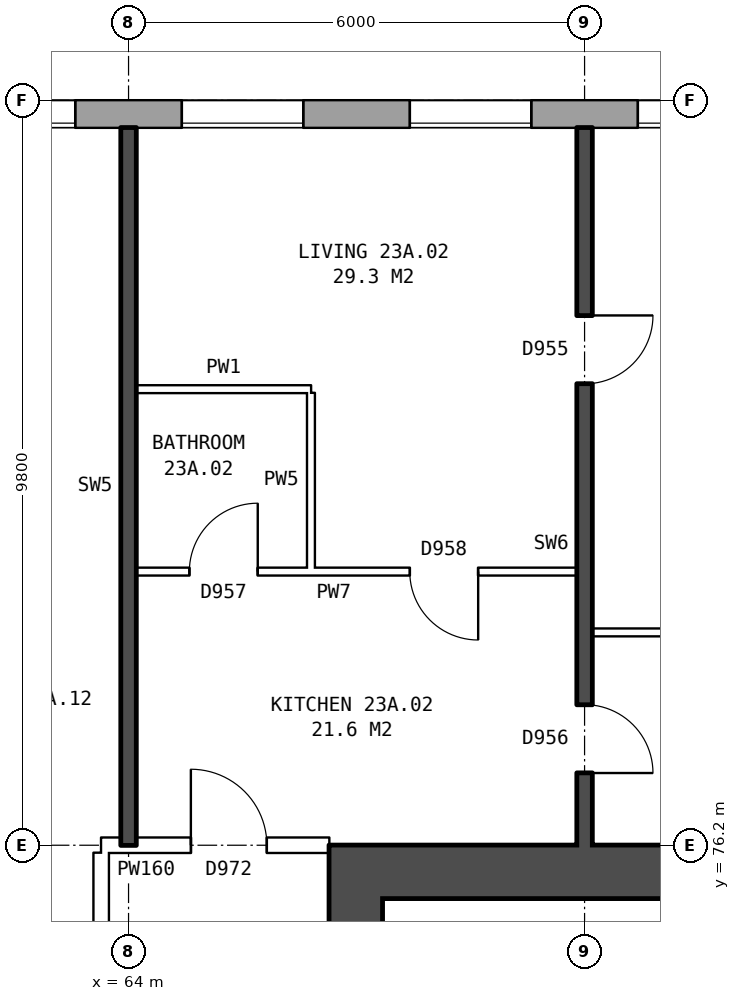
"""IFC4 building model, lengths in metres.
Left out: names, types, materials, properties, quantities, classifications, styles, units other than length and angle.
Written with IfcOpenShell. Run it as: python <this file> out.ifc"""

import sys

from ifc_helpers import new_model, si_unit, direction, frame, frame_2d, origin, place, context, subcontext, project, spatial, rectangle, extrude, element, fill, save


model = new_model("IFC4")
c1 = context("Model", 3, precision=1e-05, world=origin(), true_north=direction((0.0, 1.0)))
c2 = subcontext(c1, "Body", "Model", "MODEL_VIEW")
j1 = project(units=[si_unit("LENGTHUNIT", "METRE"), si_unit("PLANEANGLEUNIT", "RADIAN")], contexts=[c1])
p1 = place(None, origin())
s1 = spatial("IfcSite", under=j1, at=p1, CompositionType="ELEMENT")
p2 = place(p1, origin())
s2 = spatial("IfcBuilding", under=s1, at=p2, CompositionType="ELEMENT")
p3 = place(p2, frame((0.0, 0.0, 84.0)))
s3 = spatial("IfcBuildingStorey", under=s2, at=p3, CompositionType="ELEMENT", Elevation=84.0)
p4 = place(p3, frame((72.925, 85.82, 0.0), z_axis=(0.0, 0.0, 1.0), x_axis=(-1.0, 0.0, 0.0)))
e1 = element("IfcWall", 1, at=p4, inside=s3, PredefinedType="STANDARD", context=c2, shape_type="SweptSolid", body=[
    extrude(rectangle(XDim=46.601, YDim=0.36, at=frame_2d((23.3, 0.0))), origin(), (0.0, 0.0, 1.0), 2.85),
])
p5 = place(p4, frame((0.625, 0.0, 0.8)))
e2 = element("IfcOpeningElement", 2, at=p5, cuts=e1, PredefinedType="OPENING", context=c2, shape_type="SweptSolid", body=[
    extrude(rectangle(XDim=1.6, YDim=1.8, at=frame_2d((0.8, 0.9))), frame((0.0, 0.19, 0.0), z_axis=(0.0, -1.0, 0.0), x_axis=(1.0, 0.0, 0.0)), (0.0, 0.0, 1.0), 0.38),
])
p6 = place(p4, frame((3.625, 0.0, 0.8)))
e3 = element("IfcOpeningElement", 3, at=p6, cuts=e1, PredefinedType="OPENING", context=c2, shape_type="SweptSolid", body=[
    extrude(rectangle(XDim=1.6, YDim=1.8, at=frame_2d((0.8, 0.9))), frame((0.0, 0.19, 0.0), z_axis=(0.0, -1.0, 0.0), x_axis=(1.0, 0.0, 0.0)), (0.0, 0.0, 1.0), 0.38),
])
p7 = place(p4, frame((6.625, 0.0, 0.8)))
e4 = element("IfcOpeningElement", 4, at=p7, cuts=e1, PredefinedType="OPENING", context=c2, shape_type="SweptSolid", body=[
    extrude(rectangle(XDim=1.6, YDim=1.8, at=frame_2d((0.8, 0.9))), frame((0.0, 0.19, 0.0), z_axis=(0.0, -1.0, 0.0), x_axis=(1.0, 0.0, 0.0)), (0.0, 0.0, 1.0), 0.38),
])
p8 = place(p4, frame((9.625, 0.0, 0.8)))
e5 = element("IfcOpeningElement", 5, at=p8, cuts=e1, PredefinedType="OPENING", context=c2, shape_type="SweptSolid", body=[
    extrude(rectangle(XDim=1.6, YDim=1.8, at=frame_2d((0.8, 0.9))), frame((0.0, 0.19, 0.0), z_axis=(0.0, -1.0, 0.0), x_axis=(1.0, 0.0, 0.0)), (0.0, 0.0, 1.0), 0.38),
])
p9 = place(p4, frame((12.625, 0.0, 0.8)))
e6 = element("IfcOpeningElement", 6, at=p9, cuts=e1, PredefinedType="OPENING", context=c2, shape_type="SweptSolid", body=[
    extrude(rectangle(XDim=1.6, YDim=1.8, at=frame_2d((0.8, 0.9))), frame((0.0, 0.19, 0.0), z_axis=(0.0, -1.0, 0.0), x_axis=(1.0, 0.0, 0.0)), (0.0, 0.0, 1.0), 0.38),
])
p10 = place(p4, frame((15.125, 0.0, 0.8)))
e7 = element("IfcOpeningElement", 7, at=p10, cuts=e1, PredefinedType="OPENING", context=c2, shape_type="SweptSolid", body=[
    extrude(rectangle(XDim=1.6, YDim=1.8, at=frame_2d((0.8, 0.9))), frame((0.0, 0.19, 0.0), z_axis=(0.0, -1.0, 0.0), x_axis=(1.0, 0.0, 0.0)), (0.0, 0.0, 1.0), 0.38),
])
p11 = place(p4, frame((18.625, 0.0, 0.35)))
e8 = element("IfcOpeningElement", 8, at=p11, cuts=e1, PredefinedType="OPENING", context=c2, shape_type="SweptSolid", body=[
    extrude(rectangle(XDim=0.8, YDim=0.9, at=frame_2d((0.4, 0.45))), frame((0.0, 0.19, 0.0), z_axis=(0.0, -1.0, 0.0), x_axis=(1.0, 0.0, 0.0)), (0.0, 0.0, 1.0), 0.38),
])
p12 = place(p4, frame((21.625, 0.0, 0.8)))
e9 = element("IfcOpeningElement", 9, at=p12, cuts=e1, PredefinedType="OPENING", context=c2, shape_type="SweptSolid", body=[
    extrude(rectangle(XDim=1.6, YDim=1.8, at=frame_2d((0.8, 0.9))), frame((0.0, 0.19, 0.0), z_axis=(0.0, -1.0, 0.0), x_axis=(1.0, 0.0, 0.0)), (0.0, 0.0, 1.0), 0.38),
])
p13 = place(p4, frame((24.625, 0.0, 0.8)))
e10 = element("IfcOpeningElement", 10, at=p13, cuts=e1, PredefinedType="OPENING", context=c2, shape_type="SweptSolid", body=[
    extrude(rectangle(XDim=1.6, YDim=1.8, at=frame_2d((0.8, 0.9))), frame((0.0, 0.19, 0.0), z_axis=(0.0, -1.0, 0.0), x_axis=(1.0, 0.0, 0.0)), (0.0, 0.0, 1.0), 0.38),
])
p14 = place(p4, frame((29.075, 0.0, 1.4)))
e11 = element("IfcOpeningElement", 11, at=p14, cuts=e1, PredefinedType="OPENING", context=c2, shape_type="SweptSolid", body=[
    extrude(rectangle(XDim=1.2, YDim=1.2, at=frame_2d((0.6, 0.6))), frame((0.0, 0.19, 0.0), z_axis=(0.0, -1.0, 0.0), x_axis=(1.0, 0.0, 0.0)), (0.0, 0.0, 1.0), 0.38),
])
p15 = place(p4, frame((30.625, 0.0, 0.8)))
e12 = element("IfcOpeningElement", 12, at=p15, cuts=e1, PredefinedType="OPENING", context=c2, shape_type="SweptSolid", body=[
    extrude(rectangle(XDim=1.6, YDim=1.8, at=frame_2d((0.8, 0.9))), frame((0.0, 0.19, 0.0), z_axis=(0.0, -1.0, 0.0), x_axis=(1.0, 0.0, 0.0)), (0.0, 0.0, 1.0), 0.38),
])
p16 = place(p4, frame((33.625, 0.0, 0.8)))
e13 = element("IfcOpeningElement", 13, at=p16, cuts=e1, PredefinedType="OPENING", context=c2, shape_type="SweptSolid", body=[
    extrude(rectangle(XDim=1.6, YDim=1.8, at=frame_2d((0.8, 0.9))), frame((0.0, 0.19, 0.0), z_axis=(0.0, -1.0, 0.0), x_axis=(1.0, 0.0, 0.0)), (0.0, 0.0, 1.0), 0.38),
])
p17 = place(p4, frame((36.625, 0.0, 0.8)))
e14 = element("IfcOpeningElement", 14, at=p17, cuts=e1, PredefinedType="OPENING", context=c2, shape_type="SweptSolid", body=[
    extrude(rectangle(XDim=1.6, YDim=1.8, at=frame_2d((0.8, 0.9))), frame((0.0, 0.19, 0.0), z_axis=(0.0, -1.0, 0.0), x_axis=(1.0, 0.0, 0.0)), (0.0, 0.0, 1.0), 0.38),
])
p18 = place(p4, frame((39.625, 0.0, 0.8)))
e15 = element("IfcOpeningElement", 15, at=p18, cuts=e1, PredefinedType="OPENING", context=c2, shape_type="SweptSolid", body=[
    extrude(rectangle(XDim=1.6, YDim=1.8, at=frame_2d((0.8, 0.9))), frame((0.0, 0.19, 0.0), z_axis=(0.0, -1.0, 0.0), x_axis=(1.0, 0.0, 0.0)), (0.0, 0.0, 1.0), 0.38),
])
p19 = place(p4, frame((42.625, 0.0, 0.8)))
e16 = element("IfcOpeningElement", 16, at=p19, cuts=e1, PredefinedType="OPENING", context=c2, shape_type="SweptSolid", body=[
    extrude(rectangle(XDim=1.6, YDim=1.8, at=frame_2d((0.8, 0.9))), frame((0.0, 0.19, 0.0), z_axis=(0.0, -1.0, 0.0), x_axis=(1.0, 0.0, 0.0)), (0.0, 0.0, 1.0), 0.38),
])
p20 = place(p4, frame((17.025, 0.0, 1.5)))
e17 = element("IfcOpeningElement", 17, at=p20, cuts=e1, PredefinedType="OPENING", context=c2, shape_type="SweptSolid", body=[
    extrude(rectangle(XDim=0.6, YDim=0.9, at=frame_2d((0.3, 0.45))), frame((0.0, 0.19, 0.0), z_axis=(0.0, -1.0, 0.0), x_axis=(1.0, 0.0, 0.0)), (0.0, 0.0, 1.0), 0.38),
])
p21 = place(p4, frame((19.725, 0.0, 0.35)))
e18 = element("IfcOpeningElement", 18, at=p21, cuts=e1, PredefinedType="OPENING", context=c2, shape_type="SweptSolid", body=[
    extrude(rectangle(XDim=1.0, YDim=1.8, at=frame_2d((0.5, 0.9))), frame((0.0, 0.19, 0.0), z_axis=(0.0, -1.0, 0.0), x_axis=(1.0, 0.0, 0.0)), (0.0, 0.0, 1.0), 0.38),
])
p22 = place(p3, frame((66.99, 64.5, 0.0), z_axis=(0.0, 0.0, 1.0), x_axis=(0.0, 1.0, 0.0)))
e19 = element("IfcWall", 19, at=p22, inside=s3, PredefinedType="SHEAR", context=c2, shape_type="SweptSolid", body=[
    extrude(rectangle(XDim=11.0, YDim=0.7, at=frame_2d((5.5, 0.0))), origin(), (0.0, 0.0, 1.0), 2.85),
])
p23 = place(p22, frame((0.625, 0.0, 0.0)))
e20 = element("IfcOpeningElement", 20, at=p23, cuts=e19, PredefinedType="OPENING", context=c2, shape_type="SweptSolid", body=[
    extrude(rectangle(XDim=1.1, YDim=2.1, at=frame_2d((0.55, 1.05))), frame((0.0, 0.36, 0.0), z_axis=(0.0, -1.0, 0.0), x_axis=(1.0, 0.0, 0.0)), (0.0, 0.0, 1.0), 0.72),
])
p24 = place(p22, frame((9.2, 0.0, 0.0)))
e21 = element("IfcOpeningElement", 21, at=p24, cuts=e19, PredefinedType="OPENING", context=c2, shape_type="SweptSolid", body=[
    extrude(rectangle(XDim=1.1, YDim=2.1, at=frame_2d((0.55, 1.05))), frame((0.0, 0.36, 0.0), z_axis=(0.0, -1.0, 0.0), x_axis=(1.0, 0.0, 0.0)), (0.0, 0.0, 1.0), 0.72),
])
p25 = place(p3, frame((66.64, 75.85, 0.0), z_axis=(0.0, 0.0, 1.0), x_axis=(1.0, 0.0, 0.0)))
e22 = element("IfcWall", 22, at=p25, inside=s3, PredefinedType="SHEAR", context=c2, shape_type="SweptSolid", body=[
    extrude(rectangle(XDim=9.0, YDim=0.7, at=frame_2d((4.5, 0.0))), origin(), (0.0, 0.0, 1.0), 2.85),
])
p26 = place(p3, frame((63.64, 63.9, 0.0), z_axis=(0.0, 0.0, 1.0), x_axis=(0.0, 1.0, 0.0)))
e23 = element("IfcWall", 23, at=p26, inside=s3, PredefinedType="PARTITIONING", context=c2, shape_type="SweptSolid", body=[
    extrude(rectangle(XDim=12.2, YDim=0.2, at=frame_2d((6.1, 0.0))), origin(), (0.0, 0.0, 1.0), 2.85),
])
p27 = place(p26, frame((5.1, 0.0, 0.0)))
e24 = element("IfcOpeningElement", 24, at=p27, cuts=e23, PredefinedType="OPENING", context=c2, shape_type="SweptSolid", body=[
    extrude(rectangle(XDim=2.0, YDim=2.1, at=frame_2d((1.0, 1.05))), frame((0.0, 0.11, 0.0), z_axis=(0.0, -1.0, 0.0), x_axis=(1.0, 0.0, 0.0)), (0.0, 0.0, 1.0), 0.22),
])
p28 = place(p3, frame((63.64, 76.2, 0.0), z_axis=(0.0, 0.0, 1.0), x_axis=(1.0, 0.0, 0.0)))
e25 = element("IfcWall", 25, at=p28, inside=s3, PredefinedType="PARTITIONING", context=c2, shape_type="SweptSolid", body=[
    extrude(rectangle(XDim=3.0, YDim=0.2, at=frame_2d((1.5, 0.0))), origin(), (0.0, 0.0, 1.0), 2.85),
])
p29 = place(p28, frame((1.18, 0.0, 0.0)))
e26 = element("IfcOpeningElement", 26, at=p29, cuts=e25, PredefinedType="OPENING", context=c2, shape_type="SweptSolid", body=[
    extrude(rectangle(XDim=1.0, YDim=2.1, at=frame_2d((0.5, 1.05))), frame((0.0, 0.11, 0.0), z_axis=(0.0, -1.0, 0.0), x_axis=(1.0, 0.0, 0.0)), (0.0, 0.0, 1.0), 0.22),
])
p30 = place(p3, frame((70.1, 79.0, 0.0), z_axis=(0.0, 0.0, 1.0), x_axis=(1.0, 0.0, 0.0)))
e27 = element("IfcWall", 27, at=p30, inside=s3, PredefinedType="PARTITIONING", context=c2, shape_type="SweptSolid", body=[
    extrude(rectangle(XDim=5.54, YDim=0.1, at=frame_2d((2.77, 0.0))), origin(), (0.0, 0.0, 1.0), 2.85),
])
p31 = place(p3, frame((64.1, 79.8, 0.0), z_axis=(0.0, 0.0, 1.0), x_axis=(1.0, 0.0, 0.0)))
e28 = element("IfcWall", 28, at=p31, inside=s3, PredefinedType="PARTITIONING", context=c2, shape_type="SweptSolid", body=[
    extrude(rectangle(XDim=5.8, YDim=0.1, at=frame_2d((2.9, 0.0))), origin(), (0.0, 0.0, 1.0), 2.85),
])
p32 = place(p31, frame((3.6, 0.0, 0.0)))
e29 = element("IfcOpeningElement", 29, at=p32, cuts=e28, PredefinedType="OPENING", context=c2, shape_type="SweptSolid", body=[
    extrude(rectangle(XDim=0.9, YDim=2.1, at=frame_2d((0.45, 1.05))), frame((0.0, 0.06, 0.0), z_axis=(0.0, -1.0, 0.0), x_axis=(1.0, 0.0, 0.0)), (0.0, 0.0, 1.0), 0.12),
])
p33 = place(p31, frame((0.7, 0.0, 0.0)))
e30 = element("IfcOpeningElement", 30, at=p33, cuts=e28, PredefinedType="OPENING", context=c2, shape_type="SweptSolid", body=[
    extrude(rectangle(XDim=0.9, YDim=2.1, at=frame_2d((0.45, 1.05))), frame((0.0, 0.06, 0.0), z_axis=(0.0, -1.0, 0.0), x_axis=(1.0, 0.0, 0.0)), (0.0, 0.0, 1.0), 0.12),
])
p34 = place(p3, frame((64.1, 82.2, 0.0), z_axis=(0.0, 0.0, 1.0), x_axis=(1.0, 0.0, 0.0)))
e31 = element("IfcWall", 31, at=p34, inside=s3, PredefinedType="PARTITIONING", context=c2, shape_type="SweptSolid", body=[
    extrude(rectangle(XDim=2.3, YDim=0.1, at=frame_2d((1.15, 0.0))), origin(), (0.0, 0.0, 1.0), 2.85),
])
p35 = place(p3, frame((64.0, 76.2, 0.0), z_axis=(0.0, 0.0, 1.0), x_axis=(0.0, 1.0, 0.0)))
e32 = element("IfcWall", 32, at=p35, inside=s3, PredefinedType="SOLIDWALL", context=c2, shape_type="SweptSolid", body=[
    extrude(rectangle(XDim=9.44, YDim=0.2, at=frame_2d((4.72, 0.0))), origin(), (0.0, 0.0, 1.0), 2.85),
])
p36 = place(p3, frame((66.4, 79.85, 0.0), z_axis=(0.0, 0.0, 1.0), x_axis=(0.0, 1.0, 0.0)))
e33 = element("IfcWall", 33, at=p36, inside=s3, PredefinedType="PARTITIONING", context=c2, shape_type="SweptSolid", body=[
    extrude(rectangle(XDim=2.3, YDim=0.1, at=frame_2d((1.15, 0.0))), origin(), (0.0, 0.0, 1.0), 2.85),
])
p37 = place(p3, frame((70.0, 76.2, 0.0), z_axis=(0.0, 0.0, 1.0), x_axis=(0.0, 1.0, 0.0)))
e34 = element("IfcWall", 34, at=p37, inside=s3, PredefinedType="SOLIDWALL", context=c2, shape_type="SweptSolid", body=[
    extrude(rectangle(XDim=9.44, YDim=0.2, at=frame_2d((4.72, 0.0))), origin(), (0.0, 0.0, 1.0), 2.85),
])
p38 = place(p37, frame((6.07, 0.0, 0.0)))
e35 = element("IfcOpeningElement", 35, at=p38, cuts=e34, PredefinedType="OPENING", context=c2, shape_type="SweptSolid", body=[
    extrude(rectangle(XDim=0.9, YDim=2.1, at=frame_2d((0.45, 1.05))), frame((0.0, 0.11, 0.0), z_axis=(0.0, -1.0, 0.0), x_axis=(1.0, 0.0, 0.0)), (0.0, 0.0, 1.0), 0.22),
])
p39 = place(p37, frame((0.95, 0.0, 0.0)))
e36 = element("IfcOpeningElement", 36, at=p39, cuts=e34, PredefinedType="OPENING", context=c2, shape_type="SweptSolid", body=[
    extrude(rectangle(XDim=0.9, YDim=2.1, at=frame_2d((0.45, 1.05))), frame((0.0, 0.11, 0.0), z_axis=(0.0, -1.0, 0.0), x_axis=(1.0, 0.0, 0.0)), (0.0, 0.0, 1.0), 0.22),
])
p40 = place(p5, origin())
e37 = element("IfcWindow", 37, at=p40, inside=s3, PartitioningType="SINGLE_PANEL", PredefinedType="WINDOW", context=c2, shape_type="SweptSolid", body=[
    extrude(rectangle(XDim=1.6, YDim=1.8, at=frame_2d((0.8, 0.9))), frame((0.0, 0.15, 0.0), z_axis=(0.0, -1.0, 0.0), x_axis=(1.0, 0.0, 0.0)), (0.0, 0.0, 1.0), 0.06),
])
fill(e2, e37)
p41 = place(p6, origin())
e38 = element("IfcWindow", 38, at=p41, inside=s3, PartitioningType="SINGLE_PANEL", PredefinedType="WINDOW", context=c2, shape_type="SweptSolid", body=[
    extrude(rectangle(XDim=1.6, YDim=1.8, at=frame_2d((0.8, 0.9))), frame((0.0, 0.15, 0.0), z_axis=(0.0, -1.0, 0.0), x_axis=(1.0, 0.0, 0.0)), (0.0, 0.0, 1.0), 0.06),
])
fill(e3, e38)
p42 = place(p7, origin())
e39 = element("IfcWindow", 39, at=p42, inside=s3, PartitioningType="SINGLE_PANEL", PredefinedType="WINDOW", context=c2, shape_type="SweptSolid", body=[
    extrude(rectangle(XDim=1.6, YDim=1.8, at=frame_2d((0.8, 0.9))), frame((0.0, 0.15, 0.0), z_axis=(0.0, -1.0, 0.0), x_axis=(1.0, 0.0, 0.0)), (0.0, 0.0, 1.0), 0.06),
])
fill(e4, e39)
p43 = place(p8, origin())
e40 = element("IfcWindow", 40, at=p43, inside=s3, PartitioningType="SINGLE_PANEL", PredefinedType="WINDOW", context=c2, shape_type="SweptSolid", body=[
    extrude(rectangle(XDim=1.6, YDim=1.8, at=frame_2d((0.8, 0.9))), frame((0.0, 0.15, 0.0), z_axis=(0.0, -1.0, 0.0), x_axis=(1.0, 0.0, 0.0)), (0.0, 0.0, 1.0), 0.06),
])
fill(e5, e40)
p44 = place(p38, frame((0.9, 0.0, 0.0), z_axis=(0.0, 0.0, 1.0), x_axis=(-1.0, 0.0, 0.0)))
e41 = element("IfcDoor", 41, at=p44, inside=s3, OperationType="SINGLE_SWING_LEFT", PredefinedType="DOOR", context=c2, shape_type="SweptSolid", body=[
    extrude(rectangle(XDim=0.9, YDim=2.1, at=frame_2d((0.45, 1.05))), frame((0.0, 0.025, 0.0), z_axis=(0.0, -1.0, 0.0), x_axis=(1.0, 0.0, 0.0)), (0.0, 0.0, 1.0), 0.05),
])
fill(e35, e41)
p45 = place(p39, frame((0.9, 0.0, 0.0), z_axis=(0.0, 0.0, 1.0), x_axis=(-1.0, 0.0, 0.0)))
e42 = element("IfcDoor", 42, at=p45, inside=s3, OperationType="SINGLE_SWING_RIGHT", PredefinedType="DOOR", context=c2, shape_type="SweptSolid", body=[
    extrude(rectangle(XDim=0.9, YDim=2.1, at=frame_2d((0.45, 1.05))), frame((0.0, 0.025, 0.0), z_axis=(0.0, -1.0, 0.0), x_axis=(1.0, 0.0, 0.0)), (0.0, 0.0, 1.0), 0.05),
])
fill(e36, e42)
p46 = place(p29, origin())
e43 = element("IfcDoor", 43, at=p46, inside=s3, OperationType="SINGLE_SWING_LEFT", PredefinedType="DOOR", context=c2, shape_type="SweptSolid", body=[
    extrude(rectangle(XDim=1.0, YDim=2.1, at=frame_2d((0.5, 1.05))), frame((0.0, 0.025, 0.0), z_axis=(0.0, -1.0, 0.0), x_axis=(1.0, 0.0, 0.0)), (0.0, 0.0, 1.0), 0.05),
])
fill(e26, e43)
p47 = place(p32, frame((0.9, 0.0, 0.0), z_axis=(0.0, 0.0, 1.0), x_axis=(-1.0, 0.0, 0.0)))
e44 = element("IfcDoor", 44, at=p47, inside=s3, OperationType="SINGLE_SWING_LEFT", PredefinedType="DOOR", context=c2, shape_type="SweptSolid", body=[
    extrude(rectangle(XDim=0.9, YDim=2.1, at=frame_2d((0.45, 1.05))), frame((0.0, 0.025, 0.0), z_axis=(0.0, -1.0, 0.0), x_axis=(1.0, 0.0, 0.0)), (0.0, 0.0, 1.0), 0.05),
])
fill(e29, e44)
p48 = place(p33, origin())
e45 = element("IfcDoor", 45, at=p48, inside=s3, OperationType="SINGLE_SWING_RIGHT", PredefinedType="DOOR", context=c2, shape_type="SweptSolid", body=[
    extrude(rectangle(XDim=0.9, YDim=2.1, at=frame_2d((0.45, 1.05))), frame((0.0, 0.025, 0.0), z_axis=(0.0, -1.0, 0.0), x_axis=(1.0, 0.0, 0.0)), (0.0, 0.0, 1.0), 0.05),
])
fill(e30, e45)
save(model, sys.argv[1])
